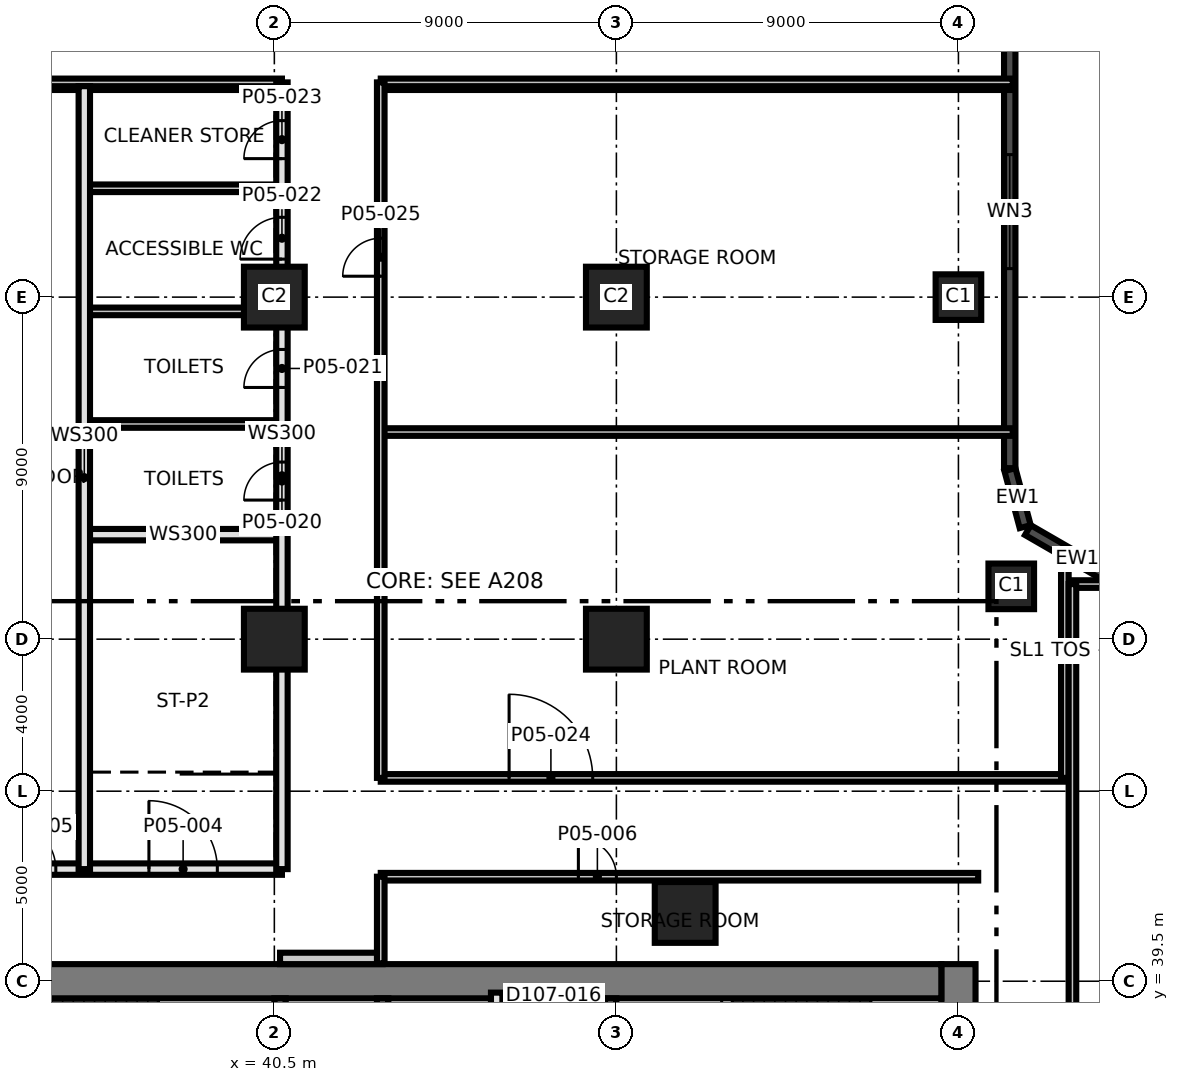
"""IFC4 building model, lengths in metres.
Left out: names, types, materials, properties, quantities, classifications, styles, units other than length and angle.
Written with IfcOpenShell. Run it as: python <this file> out.ifc"""

import sys

from ifc_helpers import new_model, si_unit, direction, frame, frame_2d, origin, origin_2d, place, context, subcontext, project, spatial, rectangle, extrude, element, fill, save


model = new_model("IFC4")
c1 = context("Model", 3, precision=1e-05, world=origin(), true_north=direction((0.0, 1.0)))
c2 = subcontext(c1, "Body", "Model", "MODEL_VIEW")
j1 = project(units=[si_unit("LENGTHUNIT", "METRE"), si_unit("PLANEANGLEUNIT", "RADIAN")], contexts=[c1])
p1 = place(None, origin())
s1 = spatial("IfcSite", under=j1, at=p1, CompositionType="ELEMENT")
p2 = place(p1, origin())
s2 = spatial("IfcBuilding", under=s1, at=p2, CompositionType="ELEMENT")
p3 = place(p2, frame((0.0, 0.0, 28.5)))
s3 = spatial("IfcBuildingStorey", under=s2, at=p3, CompositionType="ELEMENT", Elevation=28.5)
p4 = place(p3, frame((58.5, 21.05, 0.0), z_axis=(0.0, 0.0, 1.0), x_axis=(0.0, 1.0, 0.0)))
e1 = element("IfcWall", 1, at=p4, inside=s3, PredefinedType="SHEAR", context=c2, shape_type="SweptSolid", body=[
    extrude(rectangle(XDim=18.9, YDim=0.9, at=frame_2d((9.45, 0.0))), origin(), (0.0, 0.0, 1.0), 5.0),
])
p5 = place(p3, frame((31.05, 39.5, 0.0), z_axis=(0.0, 0.0, 1.0), x_axis=(1.0, 0.0, 0.0)))
e2 = element("IfcWall", 2, at=p5, inside=s3, PredefinedType="SHEAR", context=c2, shape_type="SweptSolid", body=[
    extrude(rectangle(XDim=27.0, YDim=0.9, at=frame_2d((13.5, 0.0))), origin(), (0.0, 0.0, 1.0), 5.0),
])
for number, where, z_axis, x_axis in (
    (3, (40.65, 33.5, 0.0), (0.0, 0.0, 1.0), (0.0, 1.0, 0.0)),
    (4, (43.35, 33.5, 0.0), (0.0, 0.0, 1.0), (0.0, 1.0, 0.0)),
    (5, (49.35, 33.5, 0.0), (0.0, 0.0, 1.0), (0.0, 1.0, 0.0)),
):
    element("IfcWall", number, at=place(p3, frame(where, z_axis=z_axis, x_axis=x_axis)), inside=s3, PredefinedType="SHEAR", context=c2, shape_type="SweptSolid", body=[
        extrude(rectangle(XDim=5.55, YDim=0.3, at=frame_2d((2.775, 0.0))), origin(), (0.0, 0.0, 1.0), 5.0),
    ])
for number, where, z_axis, x_axis in (
    (6, (40.5, 48.5, 0.0), (0.0, 0.0, 1.0), (1.0, 0.0, 0.0)),
    (7, (49.5, 48.5, 0.0), (0.0, 0.0, 1.0), (1.0, 0.0, 0.0)),
):
    element("IfcColumn", number, at=place(p3, frame(where, z_axis=z_axis, x_axis=x_axis)), inside=s3, PredefinedType="COLUMN", context=c2, shape_type="SweptSolid", body=[
        extrude(rectangle(XDim=1.6, YDim=1.6, at=origin_2d()), origin(), (0.0, 0.0, 1.0), 5.0),
    ])
p6 = place(p3, frame((59.89, 49.89, 0.0), z_axis=(0.0, 0.0, 1.0), x_axis=(1.0, 0.0, 0.0)))
e8 = element("IfcColumn", 8, at=p6, inside=s3, PredefinedType="COLUMN", context=c2, shape_type="SweptSolid", body=[
    extrude(rectangle(XDim=1.2, YDim=1.2, at=origin_2d()), origin(), (0.0, 0.0, 1.0), 5.0),
])
for number, where, z_axis, x_axis in (
    (9, (40.5, 57.5, 0.0), (0.0, 0.0, 1.0), (1.0, 0.0, 0.0)),
    (10, (49.5, 57.5, 0.0), (0.0, 0.0, 1.0), (1.0, 0.0, 0.0)),
):
    element("IfcColumn", number, at=place(p3, frame(where, z_axis=z_axis, x_axis=x_axis)), inside=s3, PredefinedType="COLUMN", context=c2, shape_type="SweptSolid", body=[
        extrude(rectangle(XDim=1.6, YDim=1.6, at=origin_2d()), origin(), (0.0, 0.0, 1.0), 5.0),
    ])
p7 = place(p3, frame((58.5, 57.5, 0.0), z_axis=(0.0, 0.0, 1.0), x_axis=(1.0, 0.0, 0.0)))
e11 = element("IfcColumn", 11, at=p7, inside=s3, PredefinedType="COLUMN", context=c2, shape_type="SweptSolid", body=[
    extrude(rectangle(XDim=1.2, YDim=1.2, at=origin_2d()), origin(), (0.0, 0.0, 1.0), 5.0),
])
p8 = place(p3, frame((51.31, 41.31, 0.0), z_axis=(0.0, 0.0, 1.0), x_axis=(1.0, 0.0, 0.0)))
e12 = element("IfcColumn", 12, at=p8, inside=s3, PredefinedType="COLUMN", context=c2, shape_type="SweptSolid", body=[
    extrude(rectangle(XDim=1.6, YDim=1.6, at=origin_2d()), origin(), (0.0, 0.0, 1.0), 5.0),
])
p9 = place(p3, frame((62.925, 49.87, 0.0), z_axis=(0.0, 0.0, 1.0), x_axis=(-0.866031096941, 0.499990139034, 0.0)))
e13 = element("IfcWall", 13, at=p9, inside=s3, PredefinedType="SOLIDWALL", context=c2, shape_type="SweptSolid", body=[
    extrude(rectangle(XDim=3.0, YDim=0.3, at=frame_2d((1.5, 0.0))), origin(), (0.0, 0.0, 1.0), 4.7),
])
p10 = place(p3, frame((60.257, 51.461, 0.0), z_axis=(0.0, 0.0, 1.0), x_axis=(-0.258777996848, 0.965936824201, 0.0)))
e14 = element("IfcWall", 14, at=p10, inside=s3, PredefinedType="SOLIDWALL", context=c2, shape_type="SweptSolid", body=[
    extrude(rectangle(XDim=1.553, YDim=0.3, at=frame_2d((0.776, 0.0))), origin(), (0.0, 0.0, 1.0), 4.7),
])
p11 = place(p3, frame((59.85, 53.0, 0.0), z_axis=(0.0, 0.0, 1.0), x_axis=(0.0, 1.0, 0.0)))
e15 = element("IfcWall", 15, at=p11, inside=s3, PredefinedType="SOLIDWALL", context=c2, shape_type="SweptSolid", body=[
    extrude(rectangle(XDim=26.928, YDim=0.3, at=frame_2d((13.464, 0.0))), origin(), (0.0, 0.0, 1.0), 4.7),
])
p12 = place(p11, frame((5.25, 0.0, 0.9)))
e16 = element("IfcOpeningElement", 16, at=p12, cuts=e15, PredefinedType="OPENING", context=c2, shape_type="SweptSolid", body=[
    extrude(rectangle(XDim=3.0, YDim=2.4, at=frame_2d((1.5, 1.2))), frame((0.0, 0.16, 0.0), z_axis=(0.0, -1.0, 0.0), x_axis=(1.0, 0.0, 0.0)), (0.0, 0.0, 1.0), 0.32),
])
p13 = place(p11, frame((14.25, 0.0, 0.9)))
e17 = element("IfcOpeningElement", 17, at=p13, cuts=e15, PredefinedType="OPENING", context=c2, shape_type="SweptSolid", body=[
    extrude(rectangle(XDim=3.0, YDim=2.4, at=frame_2d((1.5, 1.2))), frame((0.0, 0.16, 0.0), z_axis=(0.0, -1.0, 0.0), x_axis=(1.0, 0.0, 0.0)), (0.0, 0.0, 1.0), 0.32),
])
p14 = place(p11, frame((18.75, 0.0, 0.9)))
e18 = element("IfcOpeningElement", 18, at=p14, cuts=e15, PredefinedType="OPENING", context=c2, shape_type="SweptSolid", body=[
    extrude(rectangle(XDim=3.0, YDim=2.4, at=frame_2d((1.5, 1.2))), frame((0.0, 0.16, 0.0), z_axis=(0.0, -1.0, 0.0), x_axis=(1.0, 0.0, 0.0)), (0.0, 0.0, 1.0), 0.32),
])
p15 = place(p11, frame((23.25, 0.0, 0.9)))
e19 = element("IfcOpeningElement", 19, at=p15, cuts=e15, PredefinedType="OPENING", context=c2, shape_type="SweptSolid", body=[
    extrude(rectangle(XDim=3.0, YDim=2.4, at=frame_2d((1.5, 1.2))), frame((0.0, 0.16, 0.0), z_axis=(0.0, -1.0, 0.0), x_axis=(1.0, 0.0, 0.0)), (0.0, 0.0, 1.0), 0.32),
])
p16 = place(p3, frame((40.65, 40.1, 0.0), z_axis=(0.0, 0.0, 1.0), x_axis=(1.0, 0.0, 0.0)))
e20 = element("IfcWall", 20, at=p16, inside=s3, PredefinedType="PARTITIONING", context=c2, shape_type="SweptSolid", body=[
    extrude(rectangle(XDim=2.7, YDim=0.3, at=frame_2d((1.35, 0.0))), origin(), (0.0, 0.0, 1.0), 4.7),
])
p17 = place(p3, frame((46.35, 36.2, 0.0), z_axis=(0.0, 0.0, 1.0), x_axis=(0.0, 1.0, 0.0)))
e21 = element("IfcWall", 21, at=p17, inside=s3, PredefinedType="SOLIDWALL", context=c2, shape_type="SweptSolid", body=[
    extrude(rectangle(XDim=3.0, YDim=0.3, at=frame_2d((1.5, 0.0))), origin(), (0.0, 0.0, 1.0), 4.7),
])
p18 = place(p3, frame((43.3, 42.25, 0.0), z_axis=(0.0, 0.0, 1.0), x_axis=(1.0, 0.0, 0.0)))
e22 = element("IfcWall", 22, at=p18, inside=s3, PredefinedType="PARTITIONING", context=c2, shape_type="SweptSolid", body=[
    extrude(rectangle(XDim=15.72, YDim=0.2, at=frame_2d((7.86, 0.0))), origin(), (0.0, 0.0, 1.0), 4.7),
])
p19 = place(p18, frame((5.2, 0.0, 0.0)))
e23 = element("IfcOpeningElement", 23, at=p19, cuts=e22, PredefinedType="OPENING", context=c2, shape_type="SweptSolid", body=[
    extrude(rectangle(XDim=1.0, YDim=2.1, at=frame_2d((0.5, 1.05))), frame((0.0, 0.11, 0.0), z_axis=(0.0, -1.0, 0.0), x_axis=(1.0, 0.0, 0.0)), (0.0, 0.0, 1.0), 0.22),
])
p20 = place(p3, frame((21.07, 42.45, 0.0), z_axis=(0.0, 0.0, 1.0), x_axis=(1.0, 0.0, 0.0)))
e24 = element("IfcWall", 24, at=p20, inside=s3, PredefinedType="SOLIDWALL", context=c2, shape_type="SweptSolid", body=[
    extrude(rectangle(XDim=19.63, YDim=0.3, at=frame_2d((9.815, 0.0))), origin(), (0.0, 0.0, 1.0), 4.7),
])
p21 = place(p20, frame((16.13, 0.0, 0.0)))
e25 = element("IfcOpeningElement", 25, at=p21, cuts=e24, PredefinedType="OPENING", context=c2, shape_type="SweptSolid", body=[
    extrude(rectangle(XDim=1.8, YDim=2.1, at=frame_2d((0.9, 1.05))), frame((0.0, 0.16, 0.0), z_axis=(0.0, -1.0, 0.0), x_axis=(1.0, 0.0, 0.0)), (0.0, 0.0, 1.0), 0.32),
])
p22 = place(p20, frame((12.48, 0.0, 0.0)))
e26 = element("IfcOpeningElement", 26, at=p22, cuts=e24, PredefinedType="OPENING", context=c2, shape_type="SweptSolid", body=[
    extrude(rectangle(XDim=1.2, YDim=2.1, at=frame_2d((0.6, 1.05))), frame((0.0, 0.16, 0.0), z_axis=(0.0, -1.0, 0.0), x_axis=(1.0, 0.0, 0.0)), (0.0, 0.0, 1.0), 0.32),
])
p23 = place(p3, frame((43.3, 44.85, 0.0), z_axis=(0.0, 0.0, 1.0), x_axis=(1.0, 0.0, 0.0)))
e27 = element("IfcWall", 27, at=p23, inside=s3, PredefinedType="PARTITIONING", context=c2, shape_type="SweptSolid", body=[
    extrude(rectangle(XDim=18.2, YDim=0.2, at=frame_2d((9.1, 0.0))), origin(), (0.0, 0.0, 1.0), 4.7),
])
p24 = place(p23, frame((3.377, 0.0, 0.0)))
e28 = element("IfcOpeningElement", 28, at=p24, cuts=e27, PredefinedType="OPENING", context=c2, shape_type="SweptSolid", body=[
    extrude(rectangle(XDim=2.2, YDim=2.4, at=frame_2d((1.1, 1.2))), frame((0.0, 0.11, 0.0), z_axis=(0.0, -1.0, 0.0), x_axis=(1.0, 0.0, 0.0)), (0.0, 0.0, 1.0), 0.22),
])
p25 = place(p3, frame((61.5, 49.95, 0.0), z_axis=(0.0, 0.0, 1.0), x_axis=(1.0, 0.0, 0.0)))
e29 = element("IfcWall", 29, at=p25, inside=s3, PredefinedType="PARTITIONING", context=c2, shape_type="SweptSolid", body=[
    extrude(rectangle(XDim=1.416, YDim=0.2, at=frame_2d((0.708, 0.0))), origin(), (0.0, 0.0, 1.0), 4.7),
])
p26 = place(p3, frame((35.5, 51.25, 0.0), z_axis=(0.0, 0.0, 1.0), x_axis=(1.0, 0.0, 0.0)))
e30 = element("IfcWall", 30, at=p26, inside=s3, PredefinedType="SOLIDWALL", context=c2, shape_type="SweptSolid", body=[
    extrude(rectangle(XDim=5.2, YDim=0.3, at=frame_2d((2.6, 0.0))), origin(), (0.0, 0.0, 1.0), 4.7),
])
p27 = place(p3, frame((43.3, 53.95, 0.0), z_axis=(0.0, 0.0, 1.0), x_axis=(1.0, 0.0, 0.0)))
e31 = element("IfcWall", 31, at=p27, inside=s3, PredefinedType="PARTITIONING", context=c2, shape_type="SweptSolid", body=[
    extrude(rectangle(XDim=16.63, YDim=0.2, at=frame_2d((8.315, 0.0))), origin(), (0.0, 0.0, 1.0), 4.7),
])
for number, where, z_axis, x_axis in (
    (32, (35.55, 54.162, 0.0), (0.0, 0.0, 1.0), (1.0, 0.0, 0.0)),
    (33, (35.55, 57.125, 0.0), (0.0, 0.0, 1.0), (1.0, 0.0, 0.0)),
    (34, (35.55, 60.364, 0.0), (0.0, 0.0, 1.0), (1.0, 0.0, 0.0)),
):
    element("IfcWall", number, at=place(p3, frame(where, z_axis=z_axis, x_axis=x_axis)), inside=s3, PredefinedType="PARTITIONING", context=c2, shape_type="SweptSolid", body=[
        extrude(rectangle(XDim=5.15, YDim=0.2, at=frame_2d((2.575, 0.0))), origin(), (0.0, 0.0, 1.0), 4.7),
    ])
p28 = place(p3, frame((21.07, 63.05, 0.0), z_axis=(0.0, 0.0, 1.0), x_axis=(1.0, 0.0, 0.0)))
e35 = element("IfcWall", 35, at=p28, inside=s3, PredefinedType="PARTITIONING", context=c2, shape_type="SweptSolid", body=[
    extrude(rectangle(XDim=14.43, YDim=0.2, at=frame_2d((7.215, 0.0))), origin(), (0.0, 0.0, 1.0), 4.7),
])
p29 = place(p3, frame((35.55, 63.05, 0.0), z_axis=(0.0, 0.0, 1.0), x_axis=(1.0, 0.0, 0.0)))
e36 = element("IfcWall", 36, at=p29, inside=s3, PredefinedType="PARTITIONING", context=c2, shape_type="SweptSolid", body=[
    extrude(rectangle(XDim=5.15, YDim=0.2, at=frame_2d((2.575, 0.0))), origin(), (0.0, 0.0, 1.0), 4.7),
])
p30 = place(p3, frame((43.3, 63.05, 0.0), z_axis=(0.0, 0.0, 1.0), x_axis=(1.0, 0.0, 0.0)))
e37 = element("IfcWall", 37, at=p30, inside=s3, PredefinedType="PARTITIONING", context=c2, shape_type="SweptSolid", body=[
    extrude(rectangle(XDim=16.63, YDim=0.2, at=frame_2d((8.315, 0.0))), origin(), (0.0, 0.0, 1.0), 4.7),
])
p31 = place(p3, frame((21.07, 63.15, 0.0), z_axis=(0.0, 0.0, 1.0), x_axis=(1.0, 0.0, 0.0)))
e38 = element("IfcWall", 38, at=p31, inside=s3, PredefinedType="PARTITIONING", context=c2, shape_type="SweptSolid", body=[
    extrude(rectangle(XDim=19.63, YDim=0.2, at=frame_2d((9.815, 0.0))), origin(), (0.0, 0.0, 1.0), 4.7),
])
p32 = place(p3, frame((43.3, 63.15, 0.0), z_axis=(0.0, 0.0, 1.0), x_axis=(1.0, 0.0, 0.0)))
e39 = element("IfcWall", 39, at=p32, inside=s3, PredefinedType="PARTITIONING", context=c2, shape_type="SweptSolid", body=[
    extrude(rectangle(XDim=16.63, YDim=0.2, at=frame_2d((8.315, 0.0))), origin(), (0.0, 0.0, 1.0), 4.7),
])
p33 = place(p3, frame((35.5, 42.45, 0.0), z_axis=(0.0, 0.0, 1.0), x_axis=(0.0, 1.0, 0.0)))
e40 = element("IfcWall", 40, at=p33, inside=s3, PredefinedType="SOLIDWALL", context=c2, shape_type="SweptSolid", body=[
    extrude(rectangle(XDim=20.6, YDim=0.3, at=frame_2d((10.3, 0.0))), origin(), (0.0, 0.0, 1.0), 4.7),
])
p34 = place(p3, frame((40.7, 42.45, 0.0), z_axis=(0.0, 0.0, 1.0), x_axis=(0.0, 1.0, 0.0)))
e41 = element("IfcWall", 41, at=p34, inside=s3, PredefinedType="SOLIDWALL", context=c2, shape_type="SweptSolid", body=[
    extrude(rectangle(XDim=20.7, YDim=0.3, at=frame_2d((10.35, 0.0))), origin(), (0.0, 0.0, 1.0), 4.7),
])
p35 = place(p34, frame((9.71, 0.0, 0.0)))
e42 = element("IfcOpeningElement", 42, at=p35, cuts=e41, PredefinedType="OPENING", context=c2, shape_type="SweptSolid", body=[
    extrude(rectangle(XDim=1.0, YDim=2.1, at=frame_2d((0.5, 1.05))), frame((0.0, 0.16, 0.0), z_axis=(0.0, -1.0, 0.0), x_axis=(1.0, 0.0, 0.0)), (0.0, 0.0, 1.0), 0.32),
])
p36 = place(p34, frame((12.673, 0.0, 0.0)))
e43 = element("IfcOpeningElement", 43, at=p36, cuts=e41, PredefinedType="OPENING", context=c2, shape_type="SweptSolid", body=[
    extrude(rectangle(XDim=1.0, YDim=2.1, at=frame_2d((0.5, 1.05))), frame((0.0, 0.16, 0.0), z_axis=(0.0, -1.0, 0.0), x_axis=(1.0, 0.0, 0.0)), (0.0, 0.0, 1.0), 0.32),
])
p37 = place(p34, frame((16.05, 0.0, 0.0)))
e44 = element("IfcOpeningElement", 44, at=p37, cuts=e41, PredefinedType="OPENING", context=c2, shape_type="SweptSolid", body=[
    extrude(rectangle(XDim=1.1, YDim=2.1, at=frame_2d((0.55, 1.05))), frame((0.0, 0.16, 0.0), z_axis=(0.0, -1.0, 0.0), x_axis=(1.0, 0.0, 0.0)), (0.0, 0.0, 1.0), 0.32),
])
p38 = place(p34, frame((18.694, 0.0, 0.0)))
e45 = element("IfcOpeningElement", 45, at=p38, cuts=e41, PredefinedType="OPENING", context=c2, shape_type="SweptSolid", body=[
    extrude(rectangle(XDim=1.0, YDim=2.1, at=frame_2d((0.5, 1.05))), frame((0.0, 0.16, 0.0), z_axis=(0.0, -1.0, 0.0), x_axis=(1.0, 0.0, 0.0)), (0.0, 0.0, 1.0), 0.32),
])
p39 = place(p3, frame((43.3, 39.97, 0.0), z_axis=(0.0, 0.0, 1.0), x_axis=(0.0, 1.0, 0.0)))
e46 = element("IfcWall", 46, at=p39, inside=s3, PredefinedType="PARTITIONING", context=c2, shape_type="SweptSolid", body=[
    extrude(rectangle(XDim=2.28, YDim=0.2, at=frame_2d((1.14, 0.0))), origin(), (0.0, 0.0, 1.0), 4.7),
])
p40 = place(p3, frame((43.3, 44.85, 0.0), z_axis=(0.0, 0.0, 1.0), x_axis=(0.0, 1.0, 0.0)))
e47 = element("IfcWall", 47, at=p40, inside=s3, PredefinedType="PARTITIONING", context=c2, shape_type="SweptSolid", body=[
    extrude(rectangle(XDim=18.3, YDim=0.2, at=frame_2d((9.15, 0.0))), origin(), (0.0, 0.0, 1.0), 4.7),
])
p41 = place(p40, frame((13.2, 0.0, 0.0)))
e48 = element("IfcOpeningElement", 48, at=p41, cuts=e47, PredefinedType="OPENING", context=c2, shape_type="SweptSolid", body=[
    extrude(rectangle(XDim=1.0, YDim=2.1, at=frame_2d((0.5, 1.05))), frame((0.0, 0.11, 0.0), z_axis=(0.0, -1.0, 0.0), x_axis=(1.0, 0.0, 0.0)), (0.0, 0.0, 1.0), 0.22),
])
p42 = place(p3, frame((61.3, 44.85, 0.0), z_axis=(0.0, 0.0, 1.0), x_axis=(0.0, 1.0, 0.0)))
e49 = element("IfcWall", 49, at=p42, inside=s3, PredefinedType="PARTITIONING", context=c2, shape_type="SweptSolid", body=[
    extrude(rectangle(XDim=5.742, YDim=0.2, at=frame_2d((2.871, 0.0))), origin(), (0.0, 0.0, 1.0), 4.7),
])
p43 = place(p3, frame((61.5, 33.5, 0.0), z_axis=(0.0, 0.0, 1.0), x_axis=(0.0, 1.0, 0.0)))
e50 = element("IfcWall", 50, at=p43, inside=s3, PredefinedType="PARTITIONING", context=c2, shape_type="SweptSolid", body=[
    extrude(rectangle(XDim=16.45, YDim=0.2, at=frame_2d((8.225, 0.0))), origin(), (0.0, 0.0, 1.0), 4.7),
])
p44 = place(p12, origin())
e51 = element("IfcWindow", 51, at=p44, inside=s3, PartitioningType="SINGLE_PANEL", PredefinedType="WINDOW", context=c2, shape_type="SweptSolid", body=[
    extrude(rectangle(XDim=3.0, YDim=2.4, at=frame_2d((1.5, 1.2))), frame((0.0, 0.03, 0.0), z_axis=(0.0, -1.0, 0.0), x_axis=(1.0, 0.0, 0.0)), (0.0, 0.0, 1.0), 0.06),
])
fill(e16, e51)
p45 = place(p21, origin())
e52 = element("IfcDoor", 52, at=p45, inside=s3, OperationType="SINGLE_SWING_RIGHT", PredefinedType="DOOR", context=c2, shape_type="SweptSolid", body=[
    extrude(rectangle(XDim=1.8, YDim=2.1, at=frame_2d((0.9, 1.05))), frame((0.0, 0.025, 0.0), z_axis=(0.0, -1.0, 0.0), x_axis=(1.0, 0.0, 0.0)), (0.0, 0.0, 1.0), 0.05),
])
fill(e25, e52)
p46 = place(p22, origin())
e53 = element("IfcDoor", 53, at=p46, inside=s3, OperationType="SINGLE_SWING_LEFT", PredefinedType="DOOR", context=c2, shape_type="SweptSolid", body=[
    extrude(rectangle(XDim=1.2, YDim=2.1, at=frame_2d((0.6, 1.05))), frame((0.0, 0.025, 0.0), z_axis=(0.0, -1.0, 0.0), x_axis=(1.0, 0.0, 0.0)), (0.0, 0.0, 1.0), 0.05),
])
fill(e26, e53)
p47 = place(p19, origin())
e54 = element("IfcDoor", 54, at=p47, inside=s3, OperationType="SINGLE_SWING_RIGHT", PredefinedType="DOOR", context=c2, shape_type="SweptSolid", body=[
    extrude(rectangle(XDim=1.0, YDim=2.1, at=frame_2d((0.5, 1.05))), frame((0.0, 0.025, 0.0), z_axis=(0.0, -1.0, 0.0), x_axis=(1.0, 0.0, 0.0)), (0.0, 0.0, 1.0), 0.05),
])
fill(e23, e54)
p48 = place(p35, origin())
e55 = element("IfcDoor", 55, at=p48, inside=s3, OperationType="SINGLE_SWING_RIGHT", PredefinedType="DOOR", context=c2, shape_type="SweptSolid", body=[
    extrude(rectangle(XDim=1.0, YDim=2.1, at=frame_2d((0.5, 1.05))), frame((0.0, 0.025, 0.0), z_axis=(0.0, -1.0, 0.0), x_axis=(1.0, 0.0, 0.0)), (0.0, 0.0, 1.0), 0.05),
])
fill(e42, e55)
p49 = place(p36, origin())
e56 = element("IfcDoor", 56, at=p49, inside=s3, OperationType="SINGLE_SWING_LEFT", PredefinedType="DOOR", context=c2, shape_type="SweptSolid", body=[
    extrude(rectangle(XDim=1.0, YDim=2.1, at=frame_2d((0.5, 1.05))), frame((0.0, 0.025, 0.0), z_axis=(0.0, -1.0, 0.0), x_axis=(1.0, 0.0, 0.0)), (0.0, 0.0, 1.0), 0.05),
])
fill(e43, e56)
p50 = place(p37, origin())
e57 = element("IfcDoor", 57, at=p50, inside=s3, OperationType="SINGLE_SWING_RIGHT", PredefinedType="DOOR", context=c2, shape_type="SweptSolid", body=[
    extrude(rectangle(XDim=1.1, YDim=2.1, at=frame_2d((0.55, 1.05))), frame((0.0, 0.025, 0.0), z_axis=(0.0, -1.0, 0.0), x_axis=(1.0, 0.0, 0.0)), (0.0, 0.0, 1.0), 0.05),
])
fill(e44, e57)
p51 = place(p38, origin())
e58 = element("IfcDoor", 58, at=p51, inside=s3, OperationType="SINGLE_SWING_LEFT", PredefinedType="DOOR", context=c2, shape_type="SweptSolid", body=[
    extrude(rectangle(XDim=1.0, YDim=2.1, at=frame_2d((0.5, 1.05))), frame((0.0, 0.025, 0.0), z_axis=(0.0, -1.0, 0.0), x_axis=(1.0, 0.0, 0.0)), (0.0, 0.0, 1.0), 0.05),
])
fill(e45, e58)
p52 = place(p24, origin())
e59 = element("IfcDoor", 59, at=p52, inside=s3, OperationType="SINGLE_SWING_RIGHT", PredefinedType="DOOR", context=c2, shape_type="SweptSolid", body=[
    extrude(rectangle(XDim=2.2, YDim=2.4, at=frame_2d((1.1, 1.2))), frame((0.0, 0.025, 0.0), z_axis=(0.0, -1.0, 0.0), x_axis=(1.0, 0.0, 0.0)), (0.0, 0.0, 1.0), 0.05),
])
fill(e28, e59)
p53 = place(p41, origin())
e60 = element("IfcDoor", 60, at=p53, inside=s3, OperationType="SINGLE_SWING_LEFT", PredefinedType="DOOR", context=c2, shape_type="SweptSolid", body=[
    extrude(rectangle(XDim=1.0, YDim=2.1, at=frame_2d((0.5, 1.05))), frame((0.0, 0.025, 0.0), z_axis=(0.0, -1.0, 0.0), x_axis=(1.0, 0.0, 0.0)), (0.0, 0.0, 1.0), 0.05),
])
fill(e48, e60)
save(model, sys.argv[1])
